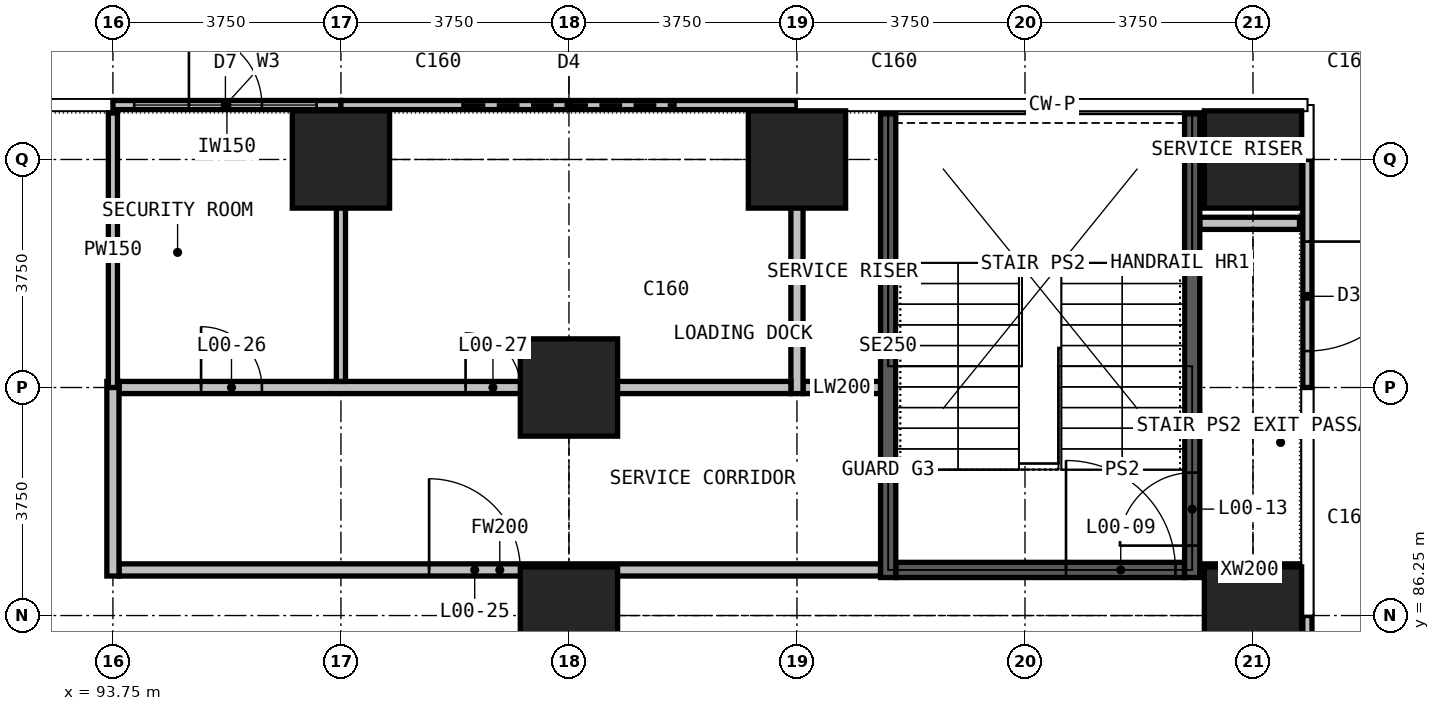
"""IFC4 building model, lengths in metres.
Left out: names, types, materials, properties, quantities, classifications, styles, units other than length and angle.
Written with IfcOpenShell. Run it as: python <this file> out.ifc"""

import sys

from ifc_helpers import new_model, si_unit, direction, frame, frame_2d, origin, origin_2d, place, context, subcontext, project, spatial, rectangle, extrude, element, fill, save


model = new_model("IFC4")
c1 = context("Model", 3, precision=1e-05, world=origin(), true_north=direction((0.0, 1.0)))
c2 = subcontext(c1, "Body", "Model", "MODEL_VIEW")
j1 = project(units=[si_unit("LENGTHUNIT", "METRE"), si_unit("PLANEANGLEUNIT", "RADIAN")], contexts=[c1])
p1 = place(None, origin())
s1 = spatial("IfcSite", under=j1, at=p1, CompositionType="ELEMENT")
p2 = place(p1, origin())
s2 = spatial("IfcBuilding", under=s1, at=p2, CompositionType="ELEMENT")
p3 = place(p2, origin())
s3 = spatial("IfcBuildingStorey", under=s2, at=p3, CompositionType="ELEMENT", Elevation=0.0)
for number, where, z_axis, x_axis in (
    (1, (97.5, 93.75, 0.0), (0.0, 0.0, 1.0), (1.0, 0.0, 0.0)),
    (2, (101.25, 86.25, 0.0), (0.0, 0.0, 1.0), (1.0, 0.0, 0.0)),
    (3, (101.25, 90.0, 0.0), (0.0, 0.0, 1.0), (1.0, 0.0, 0.0)),
    (4, (105.0, 93.75, 0.0), (0.0, 0.0, 1.0), (1.0, 0.0, 0.0)),
    (5, (112.5, 86.25, 0.0), (0.0, 0.0, 1.0), (1.0, 0.0, 0.0)),
    (6, (112.5, 93.75, 0.0), (0.0, 0.0, 1.0), (1.0, 0.0, 0.0)),
):
    element("IfcColumn", number, at=place(p3, frame(where, z_axis=z_axis, x_axis=x_axis)), inside=s3, PredefinedType="COLUMN", context=c2, shape_type="SweptSolid", body=[
        extrude(rectangle(XDim=1.6, YDim=1.6, at=origin_2d()), origin(), (0.0, 0.0, 1.0), 7.5),
    ])
p4 = place(p3, frame((113.395, 86.25, 0.0), z_axis=(0.0, 0.0, 1.0), x_axis=(0.0, -1.0, 0.0)))
e7 = element("IfcWall", 7, at=p4, inside=s3, PredefinedType="SOLIDWALL", context=c2, shape_type="SweptSolid", body=[
    extrude(rectangle(XDim=3.75, YDim=0.15, at=frame_2d((1.875, 0.0))), origin(), (0.0, 0.0, 1.0), 7.15),
])
p5 = place(p4, frame((0.85, 0.0, 0.0)))
e8 = element("IfcOpeningElement", 8, at=p5, cuts=e7, PredefinedType="OPENING", context=c2, shape_type="SweptSolid", body=[
    extrude(rectangle(XDim=2.4, YDim=2.7, at=frame_2d((1.2, 1.35))), frame((0.0, 0.085, 0.0), z_axis=(0.0, -1.0, 0.0), x_axis=(1.0, 0.0, 0.0)), (0.0, 0.0, 1.0), 0.17),
])
p6 = place(p4, frame((0.55, 0.0, 3.0)))
e9 = element("IfcOpeningElement", 9, at=p6, cuts=e7, PredefinedType="OPENING", context=c2, shape_type="SweptSolid", body=[
    extrude(rectangle(XDim=3.0, YDim=3.6, at=frame_2d((1.5, 1.8))), frame((0.0, 0.085, 0.0), z_axis=(0.0, -1.0, 0.0), x_axis=(1.0, 0.0, 0.0)), (0.0, 0.0, 1.0), 0.17),
])
p7 = place(p3, frame((113.395, 93.75, 0.0), z_axis=(0.0, 0.0, 1.0), x_axis=(0.0, -1.0, 0.0)))
e10 = element("IfcWall", 10, at=p7, inside=s3, PredefinedType="SOLIDWALL", context=c2, shape_type="SweptSolid", body=[
    extrude(rectangle(XDim=3.75, YDim=0.15, at=frame_2d((1.875, 0.0))), origin(), (0.0, 0.0, 1.0), 7.15),
])
p8 = place(p7, frame((1.35, 0.0, 0.0)))
e11 = element("IfcOpeningElement", 11, at=p8, cuts=e10, PredefinedType="OPENING", context=c2, shape_type="SweptSolid", body=[
    extrude(rectangle(XDim=1.8, YDim=2.4, at=frame_2d((0.9, 1.2))), frame((0.0, 0.085, 0.0), z_axis=(0.0, -1.0, 0.0), x_axis=(1.0, 0.0, 0.0)), (0.0, 0.0, 1.0), 0.17),
])
p9 = place(p3, frame((93.75, 94.645, 0.0), z_axis=(0.0, 0.0, 1.0), x_axis=(1.0, 0.0, 0.0)))
e12 = element("IfcWall", 12, at=p9, inside=s3, PredefinedType="SOLIDWALL", context=c2, shape_type="SweptSolid", body=[
    extrude(rectangle(XDim=3.75, YDim=0.15, at=frame_2d((1.875, 0.0))), origin(), (0.0, 0.0, 1.0), 7.15),
])
p10 = place(p9, frame((1.25, 0.0, 0.0)))
e13 = element("IfcOpeningElement", 13, at=p10, cuts=e12, PredefinedType="OPENING", context=c2, shape_type="SweptSolid", body=[
    extrude(rectangle(XDim=1.2, YDim=2.4, at=frame_2d((0.6, 1.2))), frame((0.0, 0.085, 0.0), z_axis=(0.0, -1.0, 0.0), x_axis=(1.0, 0.0, 0.0)), (0.0, 0.0, 1.0), 0.17),
])
p11 = place(p9, frame((0.35, 0.0, 3.0)))
e14 = element("IfcOpeningElement", 14, at=p11, cuts=e12, PredefinedType="OPENING", context=c2, shape_type="SweptSolid", body=[
    extrude(rectangle(XDim=3.0, YDim=3.6, at=frame_2d((1.5, 1.8))), frame((0.0, 0.085, 0.0), z_axis=(0.0, -1.0, 0.0), x_axis=(1.0, 0.0, 0.0)), (0.0, 0.0, 1.0), 0.17),
])
p12 = place(p3, frame((97.5, 94.645, 0.0), z_axis=(0.0, 0.0, 1.0), x_axis=(1.0, 0.0, 0.0)))
e15 = element("IfcWall", 15, at=p12, inside=s3, PredefinedType="SOLIDWALL", context=c2, shape_type="SweptSolid", body=[
    extrude(rectangle(XDim=7.5, YDim=0.15, at=frame_2d((3.75, 0.0))), origin(), (0.0, 0.0, 1.0), 7.15),
])
p13 = place(p12, frame((2.0, 0.0, 0.0)))
e16 = element("IfcOpeningElement", 16, at=p13, cuts=e15, PredefinedType="OPENING", context=c2, shape_type="SweptSolid", body=[
    extrude(rectangle(XDim=3.5, YDim=4.5, at=frame_2d((1.75, 2.25))), frame((0.0, 0.085, 0.0), z_axis=(0.0, -1.0, 0.0), x_axis=(1.0, 0.0, 0.0)), (0.0, 0.0, 1.0), 0.17),
])
p14 = place(p3, frame((105.1, 90.0, 0.0), z_axis=(0.0, 0.0, 1.0), x_axis=(1.0, 0.0, 0.0)))
e17 = element("IfcWall", 17, at=p14, inside=s3, PredefinedType="PARTITIONING", context=c2, shape_type="SweptSolid", body=[
    extrude(rectangle(XDim=1.275, YDim=0.2, at=frame_2d((0.637, 0.0))), origin(), (0.0, 0.0, 1.0), 7.15),
])
p15 = place(p3, frame((105.0, 89.9, 0.0), z_axis=(0.0, 0.0, 1.0), x_axis=(0.0, 1.0, 0.0)))
e18 = element("IfcWall", 18, at=p15, inside=s3, PredefinedType="PARTITIONING", context=c2, shape_type="SweptSolid", body=[
    extrude(rectangle(XDim=4.615, YDim=0.2, at=frame_2d((2.308, 0.0))), origin(), (0.0, 0.0, 1.0), 7.15),
])
p16 = place(p3, frame((93.85, 87.0, 0.0), z_axis=(0.0, 0.0, 1.0), x_axis=(1.0, 0.0, 0.0)))
e19 = element("IfcWall", 19, at=p16, inside=s3, PredefinedType="PARTITIONING", context=c2, shape_type="SweptSolid", body=[
    extrude(rectangle(XDim=12.525, YDim=0.2, at=frame_2d((6.262, 0.0))), origin(), (0.0, 0.0, 1.0), 7.15),
])
p17 = place(p16, frame((5.1, 0.0, 0.0)))
e20 = element("IfcOpeningElement", 20, at=p17, cuts=e19, PredefinedType="OPENING", context=c2, shape_type="SweptSolid", body=[
    extrude(rectangle(XDim=1.5, YDim=2.2, at=frame_2d((0.75, 1.1))), frame((0.0, 0.11, 0.0), z_axis=(0.0, -1.0, 0.0), x_axis=(1.0, 0.0, 0.0)), (0.0, 0.0, 1.0), 0.22),
])
p18 = place(p3, frame((93.85, 90.0, 0.0), z_axis=(0.0, 0.0, 1.0), x_axis=(1.0, 0.0, 0.0)))
e21 = element("IfcWall", 21, at=p18, inside=s3, PredefinedType="PARTITIONING", context=c2, shape_type="SweptSolid", body=[
    extrude(rectangle(XDim=11.05, YDim=0.2, at=frame_2d((5.525, 0.0))), origin(), (0.0, 0.0, 1.0), 7.15),
])
p19 = place(p18, frame((1.35, 0.0, 0.0)))
e22 = element("IfcOpeningElement", 22, at=p19, cuts=e21, PredefinedType="OPENING", context=c2, shape_type="SweptSolid", body=[
    extrude(rectangle(XDim=1.0, YDim=2.2, at=frame_2d((0.5, 1.1))), frame((0.0, 0.11, 0.0), z_axis=(0.0, -1.0, 0.0), x_axis=(1.0, 0.0, 0.0)), (0.0, 0.0, 1.0), 0.22),
])
p20 = place(p18, frame((5.7, 0.0, 0.0)))
e23 = element("IfcOpeningElement", 23, at=p20, cuts=e21, PredefinedType="OPENING", context=c2, shape_type="SweptSolid", body=[
    extrude(rectangle(XDim=0.9, YDim=2.2, at=frame_2d((0.45, 1.1))), frame((0.0, 0.11, 0.0), z_axis=(0.0, -1.0, 0.0), x_axis=(1.0, 0.0, 0.0)), (0.0, 0.0, 1.0), 0.22),
])
p21 = place(p3, frame((93.75, 86.9, 0.0), z_axis=(0.0, 0.0, 1.0), x_axis=(0.0, 1.0, 0.0)))
e24 = element("IfcWall", 24, at=p21, inside=s3, PredefinedType="PARTITIONING", context=c2, shape_type="SweptSolid", body=[
    extrude(rectangle(XDim=3.2, YDim=0.2, at=frame_2d((1.6, 0.0))), origin(), (0.0, 0.0, 1.0), 7.15),
])
for number, where, z_axis, x_axis in (
    (25, (111.625, 87.0, 0.0), (0.0, 0.0, 1.0), (1.0, 0.0, 0.0)),
    (26, (111.625, 92.7, 0.0), (0.0, 0.0, 1.0), (1.0, 0.0, 0.0)),
):
    element("IfcWall", number, at=place(p3, frame(where, z_axis=z_axis, x_axis=x_axis)), inside=s3, PredefinedType="PARTITIONING", context=c2, shape_type="SweptSolid", body=[
        extrude(rectangle(XDim=1.64, YDim=0.2, at=frame_2d((0.82, 0.0))), origin(), (0.0, 0.0, 1.0), 7.15),
    ])
p22 = place(p3, frame((93.75, 90.0, 0.0), z_axis=(0.0, 0.0, 1.0), x_axis=(0.0, 1.0, 0.0)))
e27 = element("IfcWall", 27, at=p22, inside=s3, PredefinedType="PARTITIONING", context=c2, shape_type="SweptSolid", body=[
    extrude(rectangle(XDim=4.515, YDim=0.15, at=frame_2d((2.257, 0.0))), origin(), (0.0, 0.0, 1.0), 7.15),
])
p23 = place(p3, frame((97.5, 90.1, 0.0), z_axis=(0.0, 0.0, 1.0), x_axis=(0.0, 1.0, 0.0)))
e28 = element("IfcWall", 28, at=p23, inside=s3, PredefinedType="PARTITIONING", context=c2, shape_type="SweptSolid", body=[
    extrude(rectangle(XDim=4.415, YDim=0.15, at=frame_2d((2.208, 0.0))), origin(), (0.0, 0.0, 1.0), 7.15),
])
p24 = place(p3, frame((106.625, 87.0, 0.0), z_axis=(0.0, 0.0, 1.0), x_axis=(1.0, 0.0, 0.0)))
e29 = element("IfcWall", 29, at=p24, inside=s3, PredefinedType="PARTITIONING", context=c2, shape_type="SweptSolid", body=[
    extrude(rectangle(XDim=4.75, YDim=0.25, at=frame_2d((2.375, 0.0))), origin(), (0.0, 0.0, 1.0), 7.15),
])
p25 = place(p24, frame((2.8, 0.0, 0.0)))
e30 = element("IfcOpeningElement", 30, at=p25, cuts=e29, PredefinedType="OPENING", context=c2, shape_type="SweptSolid", body=[
    extrude(rectangle(XDim=1.8, YDim=2.2, at=frame_2d((0.9, 1.1))), frame((0.0, 0.135, 0.0), z_axis=(0.0, -1.0, 0.0), x_axis=(1.0, 0.0, 0.0)), (0.0, 0.0, 1.0), 0.27),
])
p26 = place(p3, frame((106.5, 86.875, 0.0), z_axis=(0.0, 0.0, 1.0), x_axis=(0.0, 1.0, 0.0)))
e31 = element("IfcWall", 31, at=p26, inside=s3, PredefinedType="PARTITIONING", context=c2, shape_type="SweptSolid", body=[
    extrude(rectangle(XDim=7.625, YDim=0.25, at=frame_2d((3.812, 0.0))), origin(), (0.0, 0.0, 1.0), 7.15),
])
p27 = place(p3, frame((111.5, 86.875, 0.0), z_axis=(0.0, 0.0, 1.0), x_axis=(0.0, 1.0, 0.0)))
e32 = element("IfcWall", 32, at=p27, inside=s3, PredefinedType="PARTITIONING", context=c2, shape_type="SweptSolid", body=[
    extrude(rectangle(XDim=7.625, YDim=0.25, at=frame_2d((3.812, 0.0))), origin(), (0.0, 0.0, 1.0), 7.15),
])
p28 = place(p27, frame((0.525, 0.0, 0.0)))
e33 = element("IfcOpeningElement", 33, at=p28, cuts=e32, PredefinedType="OPENING", context=c2, shape_type="SweptSolid", body=[
    extrude(rectangle(XDim=1.2, YDim=2.2, at=frame_2d((0.6, 1.1))), frame((0.0, 0.135, 0.0), z_axis=(0.0, -1.0, 0.0), x_axis=(1.0, 0.0, 0.0)), (0.0, 0.0, 1.0), 0.27),
])
p29 = place(p8, origin())
e34 = element("IfcDoor", 34, at=p29, inside=s3, OperationType="DOUBLE_DOOR_SINGLE_SWING", PredefinedType="DOOR", context=c2, shape_type="SweptSolid", body=[
    extrude(rectangle(XDim=1.8, YDim=2.4, at=frame_2d((0.9, 1.2))), frame((0.0, 0.025, 0.0), z_axis=(0.0, -1.0, 0.0), x_axis=(1.0, 0.0, 0.0)), (0.0, 0.0, 1.0), 0.05),
])
fill(e11, e34)
p30 = place(p10, origin())
e35 = element("IfcDoor", 35, at=p30, inside=s3, OperationType="SINGLE_SWING_LEFT", PredefinedType="DOOR", context=c2, shape_type="SweptSolid", body=[
    extrude(rectangle(XDim=1.2, YDim=2.4, at=frame_2d((0.6, 1.2))), frame((0.0, 0.025, 0.0), z_axis=(0.0, -1.0, 0.0), x_axis=(1.0, 0.0, 0.0)), (0.0, 0.0, 1.0), 0.05),
])
fill(e13, e35)
p31 = place(p11, origin())
e36 = element("IfcWindow", 36, at=p31, inside=s3, PartitioningType="SINGLE_PANEL", PredefinedType="WINDOW", context=c2, shape_type="SweptSolid", body=[
    extrude(rectangle(XDim=3.0, YDim=3.6, at=frame_2d((1.5, 1.8))), frame((0.0, 0.03, 0.0), z_axis=(0.0, -1.0, 0.0), x_axis=(1.0, 0.0, 0.0)), (0.0, 0.0, 1.0), 0.06),
])
fill(e14, e36)
p32 = place(p13, origin())
e37 = element("IfcDoor", 37, at=p32, inside=s3, OperationType="ROLLINGUP", PredefinedType="DOOR", context=c2, shape_type="SweptSolid", body=[
    extrude(rectangle(XDim=3.5, YDim=4.5, at=frame_2d((1.75, 2.25))), frame((0.0, 0.025, 0.0), z_axis=(0.0, -1.0, 0.0), x_axis=(1.0, 0.0, 0.0)), (0.0, 0.0, 1.0), 0.05),
])
fill(e16, e37)
p33 = place(p25, origin())
e38 = element("IfcDoor", 38, at=p33, inside=s3, OperationType="DOUBLE_DOOR_SINGLE_SWING", PredefinedType="DOOR", context=c2, shape_type="SweptSolid", body=[
    extrude(rectangle(XDim=1.8, YDim=2.2, at=frame_2d((0.9, 1.1))), frame((0.0, 0.025, 0.0), z_axis=(0.0, -1.0, 0.0), x_axis=(1.0, 0.0, 0.0)), (0.0, 0.0, 1.0), 0.05),
])
fill(e30, e38)
p34 = place(p28, origin())
e39 = element("IfcDoor", 39, at=p34, inside=s3, OperationType="SINGLE_SWING_LEFT", PredefinedType="DOOR", context=c2, shape_type="SweptSolid", body=[
    extrude(rectangle(XDim=1.2, YDim=2.2, at=frame_2d((0.6, 1.1))), frame((0.0, 0.025, 0.0), z_axis=(0.0, -1.0, 0.0), x_axis=(1.0, 0.0, 0.0)), (0.0, 0.0, 1.0), 0.05),
])
fill(e33, e39)
p35 = place(p17, origin())
e40 = element("IfcDoor", 40, at=p35, inside=s3, OperationType="DOUBLE_DOOR_SINGLE_SWING", PredefinedType="DOOR", context=c2, shape_type="SweptSolid", body=[
    extrude(rectangle(XDim=1.5, YDim=2.2, at=frame_2d((0.75, 1.1))), frame((0.0, 0.025, 0.0), z_axis=(0.0, -1.0, 0.0), x_axis=(1.0, 0.0, 0.0)), (0.0, 0.0, 1.0), 0.05),
])
fill(e20, e40)
p36 = place(p19, origin())
e41 = element("IfcDoor", 41, at=p36, inside=s3, OperationType="SINGLE_SWING_RIGHT", PredefinedType="DOOR", context=c2, shape_type="SweptSolid", body=[
    extrude(rectangle(XDim=1.0, YDim=2.2, at=frame_2d((0.5, 1.1))), frame((0.0, 0.025, 0.0), z_axis=(0.0, -1.0, 0.0), x_axis=(1.0, 0.0, 0.0)), (0.0, 0.0, 1.0), 0.05),
])
fill(e22, e41)
p37 = place(p20, origin())
e42 = element("IfcDoor", 42, at=p37, inside=s3, OperationType="SINGLE_SWING_LEFT", PredefinedType="DOOR", context=c2, shape_type="SweptSolid", body=[
    extrude(rectangle(XDim=0.9, YDim=2.2, at=frame_2d((0.45, 1.1))), frame((0.0, 0.025, 0.0), z_axis=(0.0, -1.0, 0.0), x_axis=(1.0, 0.0, 0.0)), (0.0, 0.0, 1.0), 0.05),
])
fill(e23, e42)
save(model, sys.argv[1])
